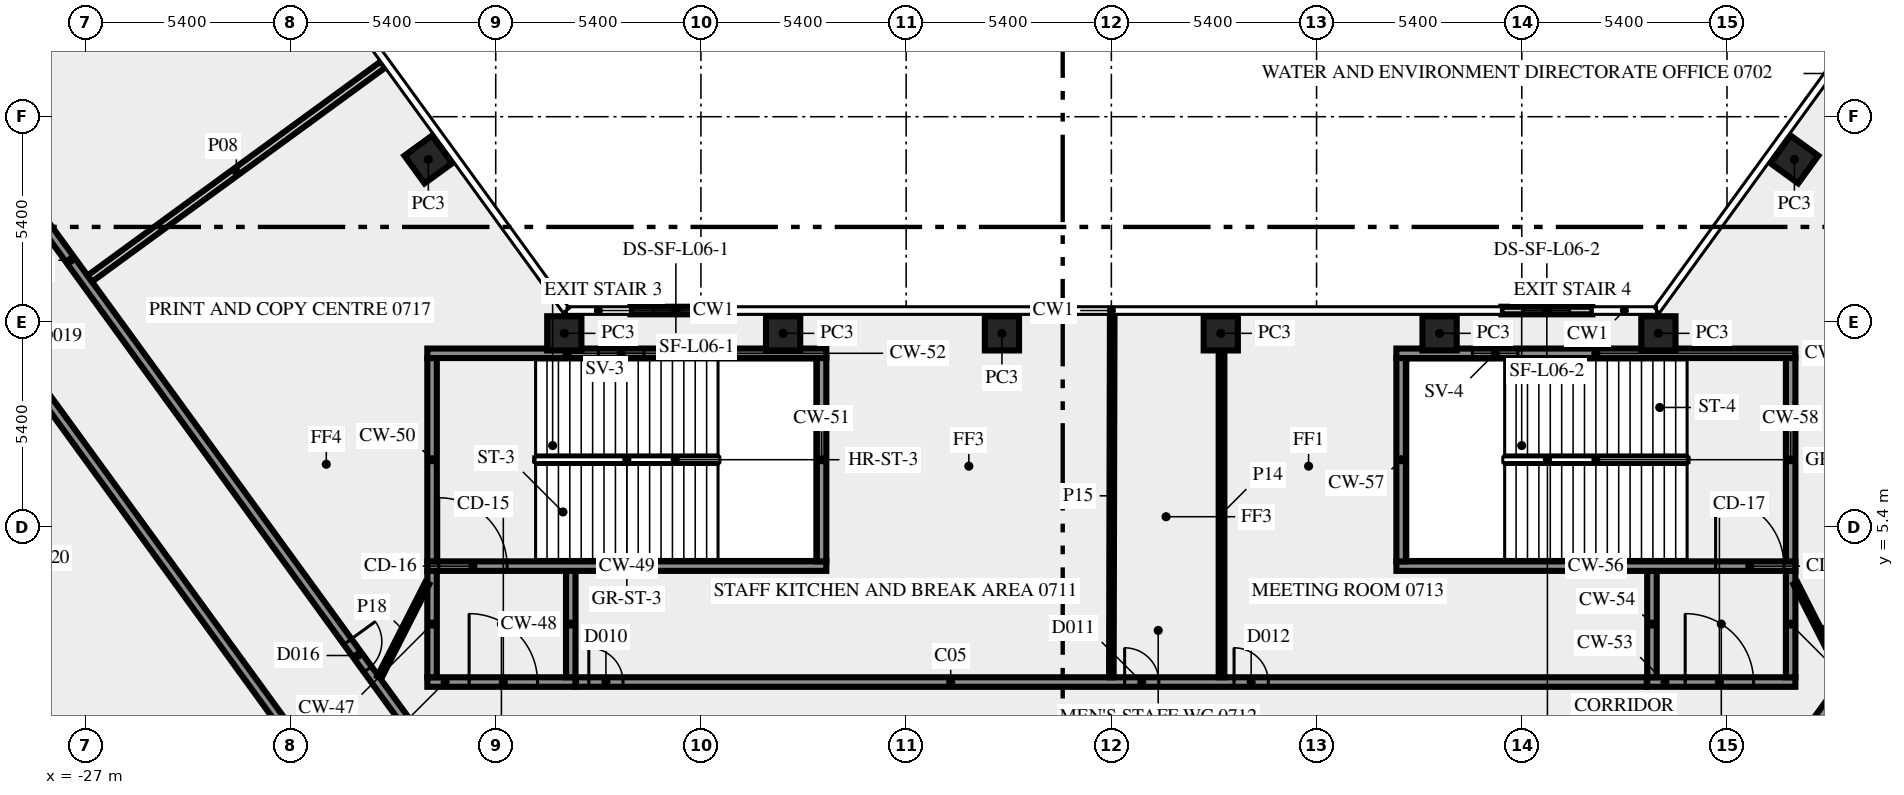
"""IFC4 building model, lengths in metres.
Left out: names, types, materials, properties, quantities, classifications, styles, units other than length and angle.
Written with IfcOpenShell. Run it as: python <this file> out.ifc"""

import sys

from ifc_helpers import new_model, si_unit, direction, frame, frame_2d, origin, origin_2d, place, context, subcontext, project, spatial, rectangle, extrude, element, fill, save


model = new_model("IFC4")
c1 = context("Model", 3, precision=1e-05, world=origin(), true_north=direction((0.0, 1.0)))
c2 = subcontext(c1, "Body", "Model", "MODEL_VIEW")
j1 = project(units=[si_unit("LENGTHUNIT", "METRE"), si_unit("PLANEANGLEUNIT", "RADIAN")], contexts=[c1])
p1 = place(None, origin())
s1 = spatial("IfcSite", under=j1, at=p1, CompositionType="ELEMENT")
p2 = place(p1, origin())
s2 = spatial("IfcBuilding", under=s1, at=p2, CompositionType="ELEMENT")
p3 = place(p2, frame((0.0, 0.0, 35.0)))
s3 = spatial("IfcBuildingStorey", under=s2, at=p3, CompositionType="ELEMENT", Elevation=35.0)
for number, where, z_axis, x_axis in (
    (1, (-17.974, 15.075, 0.0), (0.0, 0.0, 1.0), (-0.588, 0.809, 0.0)),
    (2, (17.974, 15.075, 0.0), (0.0, 0.0, 1.0), (-0.588, -0.809, 0.0)),
    (3, (14.395, 10.5, 0.0), (0.0, 0.0, 1.0), (-1.0, 0.0, 0.0)),
    (4, (8.637, 10.5, 0.0), (0.0, 0.0, 1.0), (-1.0, 0.0, 0.0)),
    (5, (2.879, 10.5, 0.0), (0.0, 0.0, 1.0), (-1.0, 0.0, 0.0)),
    (6, (-2.879, 10.5, 0.0), (0.0, 0.0, 1.0), (-1.0, 0.0, 0.0)),
    (7, (-8.637, 10.5, 0.0), (0.0, 0.0, 1.0), (-1.0, 0.0, 0.0)),
    (8, (-14.395, 10.5, 0.0), (0.0, 0.0, 1.0), (-1.0, 0.0, 0.0)),
):
    element("IfcColumn", number, at=place(p3, frame(where, z_axis=z_axis, x_axis=x_axis)), inside=s3, PredefinedType="COLUMN", context=c2, shape_type="SweptSolid", body=[
        extrude(rectangle(XDim=0.9, YDim=0.9, at=origin_2d()), origin(), (0.0, 0.0, 1.0), 3.65),
    ])
p4 = place(p3, frame((12.655, 11.1, 0.0), z_axis=(0.0, 0.0, 1.0), x_axis=(-1.0, 0.0, 0.0)))
e9 = element("IfcWall", 9, at=p4, inside=s3, PredefinedType="SOLIDWALL", context=c2, shape_type="SweptSolid", body=[
    extrude(rectangle(XDim=2.392, YDim=0.2, at=frame_2d((1.196, 0.0))), origin(), (0.0, 0.0, 1.0), 3.65),
])
p5 = place(p4, frame((0.596, 0.0, 1.0)))
e10 = element("IfcOpeningElement", 10, at=p5, cuts=e9, PredefinedType="OPENING", context=c2, shape_type="SweptSolid", body=[
    extrude(rectangle(XDim=1.2, YDim=1.2, at=frame_2d((0.6, 0.6))), frame((0.0, 0.11, 0.0), z_axis=(0.0, -1.0, 0.0), x_axis=(1.0, 0.0, 0.0)), (0.0, 0.0, 1.0), 0.22),
])
p6 = place(p3, frame((-10.263, 11.1, 0.0), z_axis=(0.0, 0.0, 1.0), x_axis=(-1.0, 0.0, 0.0)))
e11 = element("IfcWall", 11, at=p6, inside=s3, PredefinedType="SOLIDWALL", context=c2, shape_type="SweptSolid", body=[
    extrude(rectangle(XDim=2.392, YDim=0.2, at=frame_2d((1.196, 0.0))), origin(), (0.0, 0.0, 1.0), 3.65),
])
p7 = place(p6, frame((0.596, 0.0, 1.0)))
e12 = element("IfcOpeningElement", 12, at=p7, cuts=e11, PredefinedType="OPENING", context=c2, shape_type="SweptSolid", body=[
    extrude(rectangle(XDim=1.2, YDim=1.2, at=frame_2d((0.6, 0.6))), frame((0.0, 0.11, 0.0), z_axis=(0.0, -1.0, 0.0), x_axis=(1.0, 0.0, 0.0)), (0.0, 0.0, 1.0), 0.22),
])
p8 = place(p3, frame((-18.0, 1.325, 0.0), z_axis=(0.0, 0.0, 1.0), x_axis=(1.0, 0.0, 0.0)))
e13 = element("IfcWall", 13, at=p8, inside=s3, PredefinedType="SHEAR", context=c2, shape_type="SweptSolid", body=[
    extrude(rectangle(XDim=3.9, YDim=0.25, at=frame_2d((1.95, 0.0))), origin(), (0.0, 0.0, 1.0), 3.65),
])
p9 = place(p8, frame((1.1, 0.0, 0.0)))
e14 = element("IfcOpeningElement", 14, at=p9, cuts=e13, PredefinedType="OPENING", context=c2, shape_type="SweptSolid", body=[
    extrude(rectangle(XDim=1.8, YDim=2.1, at=frame_2d((0.9, 1.05))), frame((0.0, 0.135, 0.0), z_axis=(0.0, -1.0, 0.0), x_axis=(1.0, 0.0, 0.0)), (0.0, 0.0, 1.0), 0.27),
])
for number, where, z_axis, x_axis in (
    (15, (-17.875, 1.45, 0.0), (0.0, 0.0, 1.0), (0.0, 1.0, 0.0)),
    (16, (-14.225, 1.45, 0.0), (0.0, 0.0, 1.0), (0.0, 1.0, 0.0)),
):
    element("IfcWall", number, at=place(p3, frame(where, z_axis=z_axis, x_axis=x_axis)), inside=s3, PredefinedType="SHEAR", context=c2, shape_type="SweptSolid", body=[
        extrude(rectangle(XDim=2.8, YDim=0.25, at=frame_2d((1.4, 0.0))), origin(), (0.0, 0.0, 1.0), 3.65),
    ])
p10 = place(p3, frame((-18.0, 4.375, 0.0), z_axis=(0.0, 0.0, 1.0), x_axis=(1.0, 0.0, 0.0)))
e17 = element("IfcWall", 17, at=p10, inside=s3, PredefinedType="SHEAR", context=c2, shape_type="SweptSolid", body=[
    extrude(rectangle(XDim=10.5, YDim=0.25, at=frame_2d((5.25, 0.0))), origin(), (0.0, 0.0, 1.0), 3.65),
])
p11 = place(p10, frame((0.3, 0.0, 0.0)))
e18 = element("IfcOpeningElement", 18, at=p11, cuts=e17, PredefinedType="OPENING", context=c2, shape_type="SweptSolid", body=[
    extrude(rectangle(XDim=1.8, YDim=2.1, at=frame_2d((0.9, 1.05))), frame((0.0, 0.135, 0.0), z_axis=(0.0, -1.0, 0.0), x_axis=(1.0, 0.0, 0.0)), (0.0, 0.0, 1.0), 0.27),
])
for number, where, z_axis, x_axis in (
    (19, (-17.875, 4.5, 0.0), (0.0, 0.0, 1.0), (0.0, 1.0, 0.0)),
    (20, (-7.625, 4.5, 0.0), (0.0, 0.0, 1.0), (0.0, 1.0, 0.0)),
):
    element("IfcWall", number, at=place(p3, frame(where, z_axis=z_axis, x_axis=x_axis)), inside=s3, PredefinedType="SHEAR", context=c2, shape_type="SweptSolid", body=[
        extrude(rectangle(XDim=5.35, YDim=0.25, at=frame_2d((2.675, 0.0))), origin(), (0.0, 0.0, 1.0), 3.65),
    ])
p12 = place(p3, frame((-18.0, 9.975, 0.0), z_axis=(0.0, 0.0, 1.0), x_axis=(1.0, 0.0, 0.0)))
e21 = element("IfcWall", 21, at=p12, inside=s3, PredefinedType="SHEAR", context=c2, shape_type="SweptSolid", body=[
    extrude(rectangle(XDim=10.5, YDim=0.25, at=frame_2d((5.25, 0.0))), origin(), (0.0, 0.0, 1.0), 3.65),
])
p13 = place(p12, frame((4.5, 0.0, 1.0)))
e22 = element("IfcOpeningElement", 22, at=p13, cuts=e21, PredefinedType="OPENING", context=c2, shape_type="SweptSolid", body=[
    extrude(rectangle(XDim=1.2, YDim=1.2, at=frame_2d((0.6, 0.6))), frame((0.0, 0.135, 0.0), z_axis=(0.0, -1.0, 0.0), x_axis=(1.0, 0.0, 0.0)), (0.0, 0.0, 1.0), 0.27),
])
p14 = place(p3, frame((14.1, 1.325, 0.0), z_axis=(0.0, 0.0, 1.0), x_axis=(1.0, 0.0, 0.0)))
e23 = element("IfcWall", 23, at=p14, inside=s3, PredefinedType="SHEAR", context=c2, shape_type="SweptSolid", body=[
    extrude(rectangle(XDim=3.9, YDim=0.25, at=frame_2d((1.95, 0.0))), origin(), (0.0, 0.0, 1.0), 3.65),
])
p15 = place(p14, frame((1.0, 0.0, 0.0)))
e24 = element("IfcOpeningElement", 24, at=p15, cuts=e23, PredefinedType="OPENING", context=c2, shape_type="SweptSolid", body=[
    extrude(rectangle(XDim=1.8, YDim=2.1, at=frame_2d((0.9, 1.05))), frame((0.0, 0.135, 0.0), z_axis=(0.0, -1.0, 0.0), x_axis=(1.0, 0.0, 0.0)), (0.0, 0.0, 1.0), 0.27),
])
for number, where, z_axis, x_axis in (
    (25, (14.225, 1.45, 0.0), (0.0, 0.0, 1.0), (0.0, 1.0, 0.0)),
    (26, (17.875, 1.45, 0.0), (0.0, 0.0, 1.0), (0.0, 1.0, 0.0)),
):
    element("IfcWall", number, at=place(p3, frame(where, z_axis=z_axis, x_axis=x_axis)), inside=s3, PredefinedType="SHEAR", context=c2, shape_type="SweptSolid", body=[
        extrude(rectangle(XDim=2.8, YDim=0.25, at=frame_2d((1.4, 0.0))), origin(), (0.0, 0.0, 1.0), 3.65),
    ])
p16 = place(p3, frame((7.5, 4.375, 0.0), z_axis=(0.0, 0.0, 1.0), x_axis=(1.0, 0.0, 0.0)))
e27 = element("IfcWall", 27, at=p16, inside=s3, PredefinedType="SHEAR", context=c2, shape_type="SweptSolid", body=[
    extrude(rectangle(XDim=10.5, YDim=0.25, at=frame_2d((5.25, 0.0))), origin(), (0.0, 0.0, 1.0), 3.65),
])
p17 = place(p16, frame((8.4, 0.0, 0.0)))
e28 = element("IfcOpeningElement", 28, at=p17, cuts=e27, PredefinedType="OPENING", context=c2, shape_type="SweptSolid", body=[
    extrude(rectangle(XDim=1.8, YDim=2.1, at=frame_2d((0.9, 1.05))), frame((0.0, 0.135, 0.0), z_axis=(0.0, -1.0, 0.0), x_axis=(1.0, 0.0, 0.0)), (0.0, 0.0, 1.0), 0.27),
])
for number, where, z_axis, x_axis in (
    (29, (7.625, 4.5, 0.0), (0.0, 0.0, 1.0), (0.0, 1.0, 0.0)),
    (30, (17.875, 4.5, 0.0), (0.0, 0.0, 1.0), (0.0, 1.0, 0.0)),
):
    element("IfcWall", number, at=place(p3, frame(where, z_axis=z_axis, x_axis=x_axis)), inside=s3, PredefinedType="SHEAR", context=c2, shape_type="SweptSolid", body=[
        extrude(rectangle(XDim=5.35, YDim=0.25, at=frame_2d((2.675, 0.0))), origin(), (0.0, 0.0, 1.0), 3.65),
    ])
p18 = place(p3, frame((7.5, 9.975, 0.0), z_axis=(0.0, 0.0, 1.0), x_axis=(1.0, 0.0, 0.0)))
e31 = element("IfcWall", 31, at=p18, inside=s3, PredefinedType="SHEAR", context=c2, shape_type="SweptSolid", body=[
    extrude(rectangle(XDim=10.5, YDim=0.25, at=frame_2d((5.25, 0.0))), origin(), (0.0, 0.0, 1.0), 3.65),
])
p19 = place(p18, frame((2.0, 0.0, 1.0)))
e32 = element("IfcOpeningElement", 32, at=p19, cuts=e31, PredefinedType="OPENING", context=c2, shape_type="SweptSolid", body=[
    extrude(rectangle(XDim=1.2, YDim=1.2, at=frame_2d((0.6, 0.6))), frame((0.0, 0.135, 0.0), z_axis=(0.0, -1.0, 0.0), x_axis=(1.0, 0.0, 0.0)), (0.0, 0.0, 1.0), 0.27),
])
p20 = place(p3, frame((-20.531, -1.523, 0.0), z_axis=(0.0, 0.0, 1.0), x_axis=(-0.587784593204, 0.809017473231, 0.0)))
e33 = element("IfcWall", 33, at=p20, inside=s3, PredefinedType="SOLIDWALL", context=c2, shape_type="SweptSolid", body=[
    extrude(rectangle(XDim=44.67, YDim=0.25, at=frame_2d((22.335, 0.0))), origin(), (0.0, 0.0, 1.0), 3.65),
])
p21 = place(p20, frame((30.765, 0.0, 0.0)))
e34 = element("IfcOpeningElement", 34, at=p21, cuts=e33, PredefinedType="OPENING", context=c2, shape_type="SweptSolid", body=[
    extrude(rectangle(XDim=0.9, YDim=2.1, at=frame_2d((0.45, 1.05))), frame((0.0, 0.135, 0.0), z_axis=(0.0, -1.0, 0.0), x_axis=(1.0, 0.0, 0.0)), (0.0, 0.0, 1.0), 0.27),
])
p22 = place(p20, frame((14.316, 0.0, 0.0)))
e35 = element("IfcOpeningElement", 35, at=p22, cuts=e33, PredefinedType="OPENING", context=c2, shape_type="SweptSolid", body=[
    extrude(rectangle(XDim=0.9, YDim=2.1, at=frame_2d((0.45, 1.05))), frame((0.0, 0.135, 0.0), z_axis=(0.0, -1.0, 0.0), x_axis=(1.0, 0.0, 0.0)), (0.0, 0.0, 1.0), 0.27),
])
p23 = place(p20, frame((29.166, 0.0, 0.0)))
e36 = element("IfcOpeningElement", 36, at=p23, cuts=e33, PredefinedType="OPENING", context=c2, shape_type="SweptSolid", body=[
    extrude(rectangle(XDim=0.9, YDim=2.1, at=frame_2d((0.45, 1.05))), frame((0.0, 0.135, 0.0), z_axis=(0.0, -1.0, 0.0), x_axis=(1.0, 0.0, 0.0)), (0.0, 0.0, 1.0), 0.27),
])
p24 = place(p3, frame((-37.232, 25.972, 0.0), z_axis=(0.0, 0.0, 1.0), x_axis=(0.587786323093, -0.809016216391, 0.0)))
e37 = element("IfcWall", 37, at=p24, inside=s3, PredefinedType="SOLIDWALL", context=c2, shape_type="SweptSolid", body=[
    extrude(rectangle(XDim=33.493, YDim=0.25, at=frame_2d((16.747, 0.0))), origin(), (0.0, 0.0, 1.0), 3.65),
])
p25 = place(p24, frame((8.335, 0.0, 0.0)))
e38 = element("IfcOpeningElement", 38, at=p25, cuts=e37, PredefinedType="OPENING", context=c2, shape_type="SweptSolid", body=[
    extrude(rectangle(XDim=0.9, YDim=2.1, at=frame_2d((0.45, 1.05))), frame((0.0, 0.135, 0.0), z_axis=(0.0, -1.0, 0.0), x_axis=(1.0, 0.0, 0.0)), (0.0, 0.0, 1.0), 0.27),
])
p26 = place(p24, frame((29.152, 0.0, 0.0)))
e39 = element("IfcOpeningElement", 39, at=p26, cuts=e37, PredefinedType="OPENING", context=c2, shape_type="SweptSolid", body=[
    extrude(rectangle(XDim=0.9, YDim=2.1, at=frame_2d((0.45, 1.05))), frame((0.0, 0.135, 0.0), z_axis=(0.0, -1.0, 0.0), x_axis=(1.0, 0.0, 0.0)), (0.0, 0.0, 1.0), 0.27),
])
p27 = place(p24, frame((6.735, 0.0, 0.0)))
e40 = element("IfcOpeningElement", 40, at=p27, cuts=e37, PredefinedType="OPENING", context=c2, shape_type="SweptSolid", body=[
    extrude(rectangle(XDim=0.9, YDim=2.1, at=frame_2d((0.45, 1.05))), frame((0.0, 0.135, 0.0), z_axis=(0.0, -1.0, 0.0), x_axis=(1.0, 0.0, 0.0)), (0.0, 0.0, 1.0), 0.27),
])
p28 = place(p3, frame((-14.09, 1.325, 0.0), z_axis=(0.0, 0.0, 1.0), x_axis=(1.0, 0.0, 0.0)))
e41 = element("IfcWall", 41, at=p28, inside=s3, PredefinedType="SOLIDWALL", context=c2, shape_type="SweptSolid", body=[
    extrude(rectangle(XDim=28.18, YDim=0.25, at=frame_2d((14.09, 0.0))), origin(), (0.0, 0.0, 1.0), 3.65),
])
p29 = place(p28, frame((17.319, 0.0, 0.0)))
e42 = element("IfcOpeningElement", 42, at=p29, cuts=e41, PredefinedType="OPENING", context=c2, shape_type="SweptSolid", body=[
    extrude(rectangle(XDim=0.9, YDim=2.1, at=frame_2d((0.45, 1.05))), frame((0.0, 0.135, 0.0), z_axis=(0.0, -1.0, 0.0), x_axis=(1.0, 0.0, 0.0)), (0.0, 0.0, 1.0), 0.27),
])
p30 = place(p28, frame((14.44, 0.0, 0.0)))
e43 = element("IfcOpeningElement", 43, at=p30, cuts=e41, PredefinedType="OPENING", context=c2, shape_type="SweptSolid", body=[
    extrude(rectangle(XDim=0.9, YDim=2.1, at=frame_2d((0.45, 1.05))), frame((0.0, 0.135, 0.0), z_axis=(0.0, -1.0, 0.0), x_axis=(1.0, 0.0, 0.0)), (0.0, 0.0, 1.0), 0.27),
])
p31 = place(p28, frame((0.34, 0.0, 0.0)))
e44 = element("IfcOpeningElement", 44, at=p31, cuts=e41, PredefinedType="OPENING", context=c2, shape_type="SweptSolid", body=[
    extrude(rectangle(XDim=0.9, YDim=2.1, at=frame_2d((0.45, 1.05))), frame((0.0, 0.135, 0.0), z_axis=(0.0, -1.0, 0.0), x_axis=(1.0, 0.0, 0.0)), (0.0, 0.0, 1.0), 0.27),
])
p32 = place(p3, frame((17.545, -1.125, 0.0), z_axis=(0.0, 0.0, 1.0), x_axis=(0.587786323093, 0.809016216391, 0.0)))
e45 = element("IfcWall", 45, at=p32, inside=s3, PredefinedType="SOLIDWALL", context=c2, shape_type="SweptSolid", body=[
    extrude(rectangle(XDim=33.493, YDim=0.25, at=frame_2d((16.747, 0.0))), origin(), (0.0, 0.0, 1.0), 3.65),
])
p33 = place(p32, frame((25.857, 0.0, 0.0)))
e46 = element("IfcOpeningElement", 46, at=p33, cuts=e45, PredefinedType="OPENING", context=c2, shape_type="SweptSolid", body=[
    extrude(rectangle(XDim=0.9, YDim=2.1, at=frame_2d((0.45, 1.05))), frame((0.0, 0.135, 0.0), z_axis=(0.0, -1.0, 0.0), x_axis=(1.0, 0.0, 0.0)), (0.0, 0.0, 1.0), 0.27),
])
p34 = place(p32, frame((24.157, 0.0, 0.0)))
e47 = element("IfcOpeningElement", 47, at=p34, cuts=e45, PredefinedType="OPENING", context=c2, shape_type="SweptSolid", body=[
    extrude(rectangle(XDim=1.0, YDim=2.1, at=frame_2d((0.5, 1.05))), frame((0.0, 0.135, 0.0), z_axis=(0.0, -1.0, 0.0), x_axis=(1.0, 0.0, 0.0)), (0.0, 0.0, 1.0), 0.27),
])
p35 = place(p3, frame((-26.882, 11.94, 0.0), z_axis=(0.0, 0.0, 1.0), x_axis=(0.807664588563, 0.589642190131, 0.0)))
e48 = element("IfcWall", 48, at=p35, inside=s3, PredefinedType="SOLIDWALL", context=c2, shape_type="SweptSolid", body=[
    extrude(rectangle(XDim=9.55, YDim=0.2, at=frame_2d((4.775, 0.0))), origin(), (0.0, 0.0, 1.0), 2.75),
])
p36 = place(p3, frame((2.899, 10.045, 0.0), z_axis=(0.0, 0.0, 1.0), x_axis=(0.0, -1.0, 0.0)))
e49 = element("IfcWall", 49, at=p36, inside=s3, PredefinedType="PARTITIONING", context=c2, shape_type="SweptSolid", body=[
    extrude(rectangle(XDim=8.595, YDim=0.15, at=frame_2d((4.297, 0.0))), origin(), (0.0, 0.0, 1.0), 3.65),
])
p37 = place(p3, frame((0.023, 11.0, 0.0), z_axis=(0.0, 0.0, 1.0), x_axis=(-0.002377476217, -0.999997173799, 0.0)))
e50 = element("IfcWall", 50, at=p37, inside=s3, PredefinedType="PARTITIONING", context=c2, shape_type="SweptSolid", body=[
    extrude(rectangle(XDim=9.55, YDim=0.12, at=frame_2d((4.775, 0.0))), origin(), (0.0, 0.0, 1.0), 2.75),
])
for number, where, z_axis, x_axis in (
    (51, (18.0, 3.925, 0.0), (0.0, 0.0, 1.0), (0.454, -0.891, 0.0)),
    (52, (-19.261, 1.45, 0.0), (0.0, 0.0, 1.0), (0.454, 0.891, 0.0)),
):
    element("IfcWall", number, at=place(p3, frame(where, z_axis=z_axis, x_axis=x_axis)), inside=s3, PredefinedType="PARTITIONING", context=c2, shape_type="SweptSolid", body=[
        extrude(rectangle(XDim=2.778, YDim=0.12, at=frame_2d((1.389, 0.0))), origin(), (0.0, 0.0, 1.0), 3.65),
    ])
p38 = place(p5, origin())
e53 = element("IfcWindow", 53, at=p38, inside=s3, PartitioningType="SINGLE_PANEL", PredefinedType="WINDOW", context=c2, shape_type="SweptSolid", body=[
    extrude(rectangle(XDim=1.2, YDim=1.2, at=frame_2d((0.6, 0.6))), frame((0.0, 0.03, 0.0), z_axis=(0.0, -1.0, 0.0), x_axis=(1.0, 0.0, 0.0)), (0.0, 0.0, 1.0), 0.06),
])
fill(e10, e53)
p39 = place(p7, origin())
e54 = element("IfcWindow", 54, at=p39, inside=s3, PartitioningType="SINGLE_PANEL", PredefinedType="WINDOW", context=c2, shape_type="SweptSolid", body=[
    extrude(rectangle(XDim=1.2, YDim=1.2, at=frame_2d((0.6, 0.6))), frame((0.0, 0.03, 0.0), z_axis=(0.0, -1.0, 0.0), x_axis=(1.0, 0.0, 0.0)), (0.0, 0.0, 1.0), 0.06),
])
fill(e12, e54)
p40 = place(p9, origin())
e55 = element("IfcDoor", 55, at=p40, inside=s3, OperationType="DOUBLE_DOOR_SINGLE_SWING", PredefinedType="DOOR", context=c2, shape_type="SweptSolid", body=[
    extrude(rectangle(XDim=1.8, YDim=2.1, at=frame_2d((0.9, 1.05))), frame((0.0, 0.025, 0.0), z_axis=(0.0, -1.0, 0.0), x_axis=(1.0, 0.0, 0.0)), (0.0, 0.0, 1.0), 0.05),
])
fill(e14, e55)
p41 = place(p11, origin())
e56 = element("IfcDoor", 56, at=p41, inside=s3, OperationType="DOUBLE_DOOR_SINGLE_SWING", PredefinedType="DOOR", context=c2, shape_type="SweptSolid", body=[
    extrude(rectangle(XDim=1.8, YDim=2.1, at=frame_2d((0.9, 1.05))), frame((0.0, 0.025, 0.0), z_axis=(0.0, -1.0, 0.0), x_axis=(1.0, 0.0, 0.0)), (0.0, 0.0, 1.0), 0.05),
])
fill(e18, e56)
p42 = place(p13, origin())
e57 = element("IfcWindow", 57, at=p42, inside=s3, PartitioningType="SINGLE_PANEL", PredefinedType="WINDOW", context=c2, shape_type="SweptSolid", body=[
    extrude(rectangle(XDim=1.2, YDim=1.2, at=frame_2d((0.6, 0.6))), frame((0.0, 0.03, 0.0), z_axis=(0.0, -1.0, 0.0), x_axis=(1.0, 0.0, 0.0)), (0.0, 0.0, 1.0), 0.06),
])
fill(e22, e57)
p43 = place(p15, origin())
e58 = element("IfcDoor", 58, at=p43, inside=s3, OperationType="DOUBLE_DOOR_SINGLE_SWING", PredefinedType="DOOR", context=c2, shape_type="SweptSolid", body=[
    extrude(rectangle(XDim=1.8, YDim=2.1, at=frame_2d((0.9, 1.05))), frame((0.0, 0.025, 0.0), z_axis=(0.0, -1.0, 0.0), x_axis=(1.0, 0.0, 0.0)), (0.0, 0.0, 1.0), 0.05),
])
fill(e24, e58)
p44 = place(p17, origin())
e59 = element("IfcDoor", 59, at=p44, inside=s3, OperationType="DOUBLE_DOOR_SINGLE_SWING", PredefinedType="DOOR", context=c2, shape_type="SweptSolid", body=[
    extrude(rectangle(XDim=1.8, YDim=2.1, at=frame_2d((0.9, 1.05))), frame((0.0, 0.025, 0.0), z_axis=(0.0, -1.0, 0.0), x_axis=(1.0, 0.0, 0.0)), (0.0, 0.0, 1.0), 0.05),
])
fill(e28, e59)
p45 = place(p19, origin())
e60 = element("IfcWindow", 60, at=p45, inside=s3, PartitioningType="SINGLE_PANEL", PredefinedType="WINDOW", context=c2, shape_type="SweptSolid", body=[
    extrude(rectangle(XDim=1.2, YDim=1.2, at=frame_2d((0.6, 0.6))), frame((0.0, 0.03, 0.0), z_axis=(0.0, -1.0, 0.0), x_axis=(1.0, 0.0, 0.0)), (0.0, 0.0, 1.0), 0.06),
])
fill(e32, e60)
p46 = place(p29, origin())
e61 = element("IfcDoor", 61, at=p46, inside=s3, OperationType="SINGLE_SWING_LEFT", PredefinedType="DOOR", context=c2, shape_type="SweptSolid", body=[
    extrude(rectangle(XDim=0.9, YDim=2.1, at=frame_2d((0.45, 1.05))), frame((0.0, 0.025, 0.0), z_axis=(0.0, -1.0, 0.0), x_axis=(1.0, 0.0, 0.0)), (0.0, 0.0, 1.0), 0.05),
])
fill(e42, e61)
p47 = place(p30, origin())
e62 = element("IfcDoor", 62, at=p47, inside=s3, OperationType="SINGLE_SWING_LEFT", PredefinedType="DOOR", context=c2, shape_type="SweptSolid", body=[
    extrude(rectangle(XDim=0.9, YDim=2.1, at=frame_2d((0.45, 1.05))), frame((0.0, 0.025, 0.0), z_axis=(0.0, -1.0, 0.0), x_axis=(1.0, 0.0, 0.0)), (0.0, 0.0, 1.0), 0.05),
])
fill(e43, e62)
p48 = place(p26, origin())
e63 = element("IfcDoor", 63, at=p48, inside=s3, OperationType="SINGLE_SWING_RIGHT", PredefinedType="DOOR", context=c2, shape_type="SweptSolid", body=[
    extrude(rectangle(XDim=0.9, YDim=2.1, at=frame_2d((0.45, 1.05))), frame((0.0, 0.025, 0.0), z_axis=(0.0, -1.0, 0.0), x_axis=(1.0, 0.0, 0.0)), (0.0, 0.0, 1.0), 0.05),
])
fill(e39, e63)
p49 = place(p31, origin())
e64 = element("IfcDoor", 64, at=p49, inside=s3, OperationType="SINGLE_SWING_LEFT", PredefinedType="DOOR", context=c2, shape_type="SweptSolid", body=[
    extrude(rectangle(XDim=0.9, YDim=2.1, at=frame_2d((0.45, 1.05))), frame((0.0, 0.025, 0.0), z_axis=(0.0, -1.0, 0.0), x_axis=(1.0, 0.0, 0.0)), (0.0, 0.0, 1.0), 0.05),
])
fill(e44, e64)
save(model, sys.argv[1])
